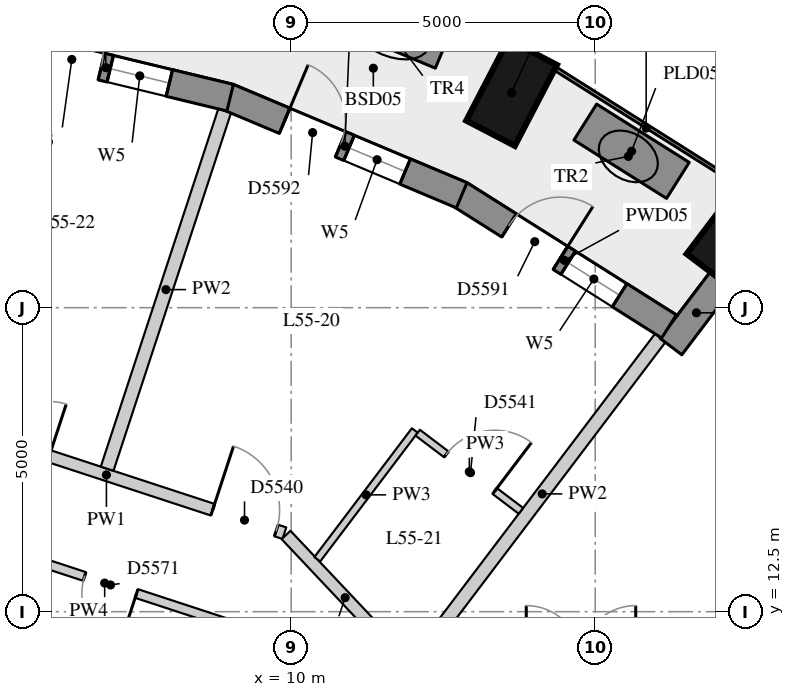
"""IFC4 building model, lengths in metres.
Left out: names, types, materials, properties, quantities, classifications, styles, units other than length and angle.
Written with IfcOpenShell. Run it as: python <this file> out.ifc"""

import sys

from ifc_helpers import new_model, si_unit, direction, frame, frame_2d, origin, origin_2d, place, context, subcontext, project, spatial, rectangle, extrude, element, fill, save


model = new_model("IFC4")
c1 = context("Model", 3, precision=1e-05, world=origin(), true_north=direction((0.0, 1.0)))
c2 = subcontext(c1, "Body", "Model", "MODEL_VIEW")
j1 = project(units=[si_unit("LENGTHUNIT", "METRE"), si_unit("PLANEANGLEUNIT", "RADIAN")], contexts=[c1])
p1 = place(None, origin())
s1 = spatial("IfcSite", under=j1, at=p1, CompositionType="ELEMENT")
p2 = place(p1, origin())
s2 = spatial("IfcBuilding", under=s1, at=p2, CompositionType="ELEMENT")
p3 = place(p2, frame((0.0, 0.0, 195.8)))
s3 = spatial("IfcBuildingStorey", under=s2, at=p3, CompositionType="ELEMENT", Elevation=195.8)
for number, where, z_axis, x_axis in (
    (1, (17.316, 18.71, 0.0), (0.0, 0.0, 1.0), (0.604, 0.797, 0.0)),
    (2, (13.625, 21.035, 0.0), (0.0, 0.0, 1.0), (0.462, 0.887, 0.0)),
):
    element("IfcColumn", number, at=place(p3, frame(where, z_axis=z_axis, x_axis=x_axis)), inside=s3, PredefinedType="COLUMN", context=c2, shape_type="SweptSolid", body=[
        extrude(rectangle(XDim=1.5, YDim=0.9, at=origin_2d()), origin(), (0.0, 0.0, 1.0), 3.3),
    ])
p4 = place(p3, frame((17.085, 17.97, 0.0), z_axis=(0.0, 0.0, 1.0), x_axis=(-0.603644757989, -0.797253414011, 0.0)))
e3 = element("IfcWall", 3, at=p4, inside=s3, PredefinedType="SOLIDWALL", context=c2, shape_type="SweptSolid", body=[
    extrude(rectangle(XDim=1.391, YDim=0.45, at=frame_2d((0.695, 0.0))), origin(), (0.0, 0.0, 1.0), 3.02),
])
p5 = place(p3, frame((16.213, 17.192, 0.0), z_axis=(0.0, 0.0, 1.0), x_axis=(-0.84545185308, 0.534051649303, 0.0)))
e4 = element("IfcWall", 4, at=p5, inside=s3, PredefinedType="SOLIDWALL", context=c2, shape_type="SweptSolid", body=[
    extrude(rectangle(XDim=4.071, YDim=0.45, at=frame_2d((2.036, 0.0))), origin(), (0.0, 0.0, 1.0), 3.02),
])
p6 = place(p5, frame((0.961, 0.0, 0.4)))
e5 = element("IfcOpeningElement", 5, at=p6, cuts=e4, PredefinedType="OPENING", context=c2, shape_type="SweptSolid", body=[
    extrude(rectangle(XDim=1.0, YDim=1.75, at=frame_2d((0.5, 0.875))), frame((0.0, 0.235, 0.0), z_axis=(0.0, -1.0, 0.0), x_axis=(1.0, 0.0, 0.0)), (0.0, 0.0, 1.0), 0.47),
])
p7 = place(p5, frame((2.111, 0.0, 0.0)))
e6 = element("IfcOpeningElement", 6, at=p7, cuts=e4, PredefinedType="OPENING", context=c2, shape_type="SweptSolid", body=[
    extrude(rectangle(XDim=1.0, YDim=2.15, at=frame_2d((0.5, 1.075))), frame((0.0, 0.235, 0.0), z_axis=(0.0, -1.0, 0.0), x_axis=(1.0, 0.0, 0.0)), (0.0, 0.0, 1.0), 0.47),
])
p8 = place(p3, frame((12.804, 19.349, 0.0), z_axis=(0.0, 0.0, 1.0), x_axis=(-0.921751093055, 0.387782055351, 0.0)))
e7 = element("IfcWall", 7, at=p8, inside=s3, PredefinedType="SOLIDWALL", context=c2, shape_type="SweptSolid", body=[
    extrude(rectangle(XDim=4.168, YDim=0.45, at=frame_2d((2.084, 0.0))), origin(), (0.0, 0.0, 1.0), 3.02),
])
p9 = place(p8, frame((1.009, 0.0, 0.4)))
e8 = element("IfcOpeningElement", 8, at=p9, cuts=e7, PredefinedType="OPENING", context=c2, shape_type="SweptSolid", body=[
    extrude(rectangle(XDim=1.0, YDim=1.75, at=frame_2d((0.5, 0.875))), frame((0.0, 0.235, 0.0), z_axis=(0.0, -1.0, 0.0), x_axis=(1.0, 0.0, 0.0)), (0.0, 0.0, 1.0), 0.47),
])
p10 = place(p8, frame((2.159, 0.0, 0.0)))
e9 = element("IfcOpeningElement", 9, at=p10, cuts=e7, PredefinedType="OPENING", context=c2, shape_type="SweptSolid", body=[
    extrude(rectangle(XDim=1.0, YDim=2.15, at=frame_2d((0.5, 1.075))), frame((0.0, 0.235, 0.0), z_axis=(0.0, -1.0, 0.0), x_axis=(1.0, 0.0, 0.0)), (0.0, 0.0, 1.0), 0.47),
])
p11 = place(p3, frame((8.996, 20.954, 0.0), z_axis=(0.0, 0.0, 1.0), x_axis=(-0.971994057868, 0.235005428593, 0.0)))
e10 = element("IfcWall", 10, at=p11, inside=s3, PredefinedType="SOLIDWALL", context=c2, shape_type="SweptSolid", body=[
    extrude(rectangle(XDim=4.208, YDim=0.45, at=frame_2d((2.104, 0.0))), origin(), (0.0, 0.0, 1.0), 3.02),
])
p12 = place(p11, frame((1.029, 0.0, 0.4)))
e11 = element("IfcOpeningElement", 11, at=p12, cuts=e10, PredefinedType="OPENING", context=c2, shape_type="SweptSolid", body=[
    extrude(rectangle(XDim=1.0, YDim=1.75, at=frame_2d((0.5, 0.875))), frame((0.0, 0.235, 0.0), z_axis=(0.0, -1.0, 0.0), x_axis=(1.0, 0.0, 0.0)), (0.0, 0.0, 1.0), 0.47),
])
p13 = place(p11, frame((2.179, 0.0, 0.0)))
e12 = element("IfcOpeningElement", 12, at=p13, cuts=e10, PredefinedType="OPENING", context=c2, shape_type="SweptSolid", body=[
    extrude(rectangle(XDim=1.0, YDim=2.15, at=frame_2d((0.5, 1.075))), frame((0.0, 0.235, 0.0), z_axis=(0.0, -1.0, 0.0), x_axis=(1.0, 0.0, 0.0)), (0.0, 0.0, 1.0), 0.47),
])
p14 = place(p3, frame((16.36, 19.593, 0.0), z_axis=(0.0, 0.0, 1.0), x_axis=(-0.846149017978, 0.532946375703, 0.0)))
e13 = element("IfcWall", 13, at=p14, inside=s3, PredefinedType="USERDEFINED", context=c2, shape_type="SweptSolid", body=[
    extrude(rectangle(XDim=1.8, YDim=0.7, at=frame_2d((0.9, 0.0))), origin(), (0.0, 0.0, 1.0), 0.75),
])
p15 = place(p3, frame((12.506, 21.762, 0.0), z_axis=(0.0, 0.0, 1.0), x_axis=(-0.922155368213, 0.386819695564, 0.0)))
e14 = element("IfcWall", 14, at=p15, inside=s3, PredefinedType="USERDEFINED", context=c2, shape_type="SweptSolid", body=[
    extrude(rectangle(XDim=1.8, YDim=0.7, at=frame_2d((0.9, 0.0))), origin(), (0.0, 0.0, 1.0), 0.75),
])
p16 = place(p3, frame((4.035, 15.708, 0.0), z_axis=(0.0, 0.0, 1.0), x_axis=(0.950331063317, -0.31124085544, 0.0)))
e15 = element("IfcWall", 15, at=p16, inside=s3, PredefinedType="PARTITIONING", context=c2, shape_type="SweptSolid", body=[
    extrude(rectangle(XDim=6.159, YDim=0.2, at=frame_2d((3.08, 0.0))), origin(), (0.0, 0.0, 1.0), 3.02),
])
p17 = place(p16, frame((4.919, 0.0, 0.0)))
e16 = element("IfcOpeningElement", 16, at=p17, cuts=e15, PredefinedType="OPENING", context=c2, shape_type="SweptSolid", body=[
    extrude(rectangle(XDim=1.1, YDim=2.1, at=frame_2d((0.55, 1.05))), frame((0.0, 0.11, 0.0), z_axis=(0.0, -1.0, 0.0), x_axis=(1.0, 0.0, 0.0)), (0.0, 0.0, 1.0), 0.22),
])
p18 = place(p16, frame((1.189, 0.0, 0.0)))
e17 = element("IfcOpeningElement", 17, at=p18, cuts=e15, PredefinedType="OPENING", context=c2, shape_type="SweptSolid", body=[
    extrude(rectangle(XDim=0.9, YDim=2.1, at=frame_2d((0.45, 1.05))), frame((0.0, 0.11, 0.0), z_axis=(0.0, -1.0, 0.0), x_axis=(1.0, 0.0, 0.0)), (0.0, 0.0, 1.0), 0.22),
])
p19 = place(p3, frame((9.916, 13.762, 0.0), z_axis=(0.0, 0.0, 1.0), x_axis=(0.686041532799, -0.727562378958, 0.0)))
e18 = element("IfcWall", 18, at=p19, inside=s3, PredefinedType="PARTITIONING", context=c2, shape_type="SweptSolid", body=[
    extrude(rectangle(XDim=2.834, YDim=0.2, at=frame_2d((1.417, 0.0))), origin(), (0.0, 0.0, 1.0), 3.02),
])
p20 = place(p3, frame((4.917, 13.631, 0.0), z_axis=(0.0, 0.0, 1.0), x_axis=(0.950299632499, -0.311336808733, 0.0)))
e19 = element("IfcWall", 19, at=p20, inside=s3, PredefinedType="PARTITIONING", context=c2, shape_type="SweptSolid", body=[
    extrude(rectangle(XDim=4.241, YDim=0.15, at=frame_2d((2.121, 0.0))), origin(), (0.0, 0.0, 1.0), 3.02),
])
p21 = place(p20, frame((1.773, 0.0, 0.0)))
e20 = element("IfcOpeningElement", 20, at=p21, cuts=e19, PredefinedType="OPENING", context=c2, shape_type="SweptSolid", body=[
    extrude(rectangle(XDim=0.9, YDim=2.1, at=frame_2d((0.45, 1.05))), frame((0.0, 0.085, 0.0), z_axis=(0.0, -1.0, 0.0), x_axis=(1.0, 0.0, 0.0)), (0.0, 0.0, 1.0), 0.17),
])
p22 = place(p3, frame((16.077, 17.011, 0.0), z_axis=(0.0, 0.0, 1.0), x_axis=(-0.603635635975, -0.797260320712, 0.0)))
e21 = element("IfcWall", 21, at=p22, inside=s3, PredefinedType="PARTITIONING", context=c2, shape_type="SweptSolid", body=[
    extrude(rectangle(XDim=6.457, YDim=0.22, at=frame_2d((3.229, 0.0))), origin(), (0.0, 0.0, 1.0), 3.02),
])
p23 = place(p3, frame((8.908, 20.743, 0.0), z_axis=(0.0, 0.0, 1.0), x_axis=(-0.311984764468, -0.950087104817, 0.0)))
e22 = element("IfcWall", 22, at=p23, inside=s3, PredefinedType="PARTITIONING", context=c2, shape_type="SweptSolid", body=[
    extrude(rectangle(XDim=6.202, YDim=0.22, at=frame_2d((3.101, 0.0))), origin(), (0.0, 0.0, 1.0), 3.02),
])
p24 = place(p3, frame((10.43, 13.363, 0.0), z_axis=(0.0, 0.0, 1.0), x_axis=(0.603597479969, 0.797289208616, 0.0)))
e23 = element("IfcWall", 23, at=p24, inside=s3, PredefinedType="PARTITIONING", context=c2, shape_type="SweptSolid", body=[
    extrude(rectangle(XDim=2.656, YDim=0.12, at=frame_2d((1.328, 0.0))), origin(), (0.0, 0.0, 1.0), 3.02),
])
p25 = place(p3, frame((12.081, 15.444, 0.0), z_axis=(0.0, 0.0, 1.0), x_axis=(0.797240905551, -0.603661277967, 0.0)))
e24 = element("IfcWall", 24, at=p25, inside=s3, PredefinedType="PARTITIONING", context=c2, shape_type="SweptSolid", body=[
    extrude(rectangle(XDim=2.13, YDim=0.12, at=frame_2d((1.065, 0.0))), origin(), (0.0, 0.0, 1.0), 3.02),
])
p26 = place(p25, frame((0.59, 0.0, 0.0)))
e25 = element("IfcOpeningElement", 25, at=p26, cuts=e24, PredefinedType="OPENING", context=c2, shape_type="SweptSolid", body=[
    extrude(rectangle(XDim=1.0, YDim=2.1, at=frame_2d((0.5, 1.05))), frame((0.0, 0.07, 0.0), z_axis=(0.0, -1.0, 0.0), x_axis=(1.0, 0.0, 0.0)), (0.0, 0.0, 1.0), 0.14),
])
p27 = place(p6, origin())
e26 = element("IfcWindow", 26, at=p27, inside=s3, PartitioningType="SINGLE_PANEL", PredefinedType="WINDOW", context=c2, shape_type="SweptSolid", body=[
    extrude(rectangle(XDim=1.0, YDim=1.75, at=frame_2d((0.5, 0.875))), frame((0.0, 0.035, 0.0), z_axis=(0.0, -1.0, 0.0), x_axis=(1.0, 0.0, 0.0)), (0.0, 0.0, 1.0), 0.06),
])
fill(e5, e26)
p28 = place(p7, frame((1.0, 0.0, 0.0), z_axis=(0.0, 0.0, 1.0), x_axis=(-1.0, 0.0, 0.0)))
e27 = element("IfcDoor", 27, at=p28, inside=s3, OperationType="SINGLE_SWING_RIGHT", PredefinedType="DOOR", context=c2, shape_type="SweptSolid", body=[
    extrude(rectangle(XDim=1.0, YDim=2.15, at=frame_2d((0.5, 1.075))), frame((0.0, 0.075, 0.0), z_axis=(0.0, -1.0, 0.0), x_axis=(1.0, 0.0, 0.0)), (0.0, 0.0, 1.0), 0.05),
])
fill(e6, e27)
p29 = place(p9, origin())
e28 = element("IfcWindow", 28, at=p29, inside=s3, PartitioningType="SINGLE_PANEL", PredefinedType="WINDOW", context=c2, shape_type="SweptSolid", body=[
    extrude(rectangle(XDim=1.0, YDim=1.75, at=frame_2d((0.5, 0.875))), frame((0.0, 0.035, 0.0), z_axis=(0.0, -1.0, 0.0), x_axis=(1.0, 0.0, 0.0)), (0.0, 0.0, 1.0), 0.06),
])
fill(e8, e28)
p30 = place(p10, frame((1.0, 0.0, 0.0), z_axis=(0.0, 0.0, 1.0), x_axis=(-1.0, 0.0, 0.0)))
e29 = element("IfcDoor", 29, at=p30, inside=s3, OperationType="SINGLE_SWING_LEFT", PredefinedType="DOOR", context=c2, shape_type="SweptSolid", body=[
    extrude(rectangle(XDim=1.0, YDim=2.15, at=frame_2d((0.5, 1.075))), frame((0.0, 0.075, 0.0), z_axis=(0.0, -1.0, 0.0), x_axis=(1.0, 0.0, 0.0)), (0.0, 0.0, 1.0), 0.05),
])
fill(e9, e29)
p31 = place(p12, origin())
e30 = element("IfcWindow", 30, at=p31, inside=s3, PartitioningType="SINGLE_PANEL", PredefinedType="WINDOW", context=c2, shape_type="SweptSolid", body=[
    extrude(rectangle(XDim=1.0, YDim=1.75, at=frame_2d((0.5, 0.875))), frame((0.0, 0.035, 0.0), z_axis=(0.0, -1.0, 0.0), x_axis=(1.0, 0.0, 0.0)), (0.0, 0.0, 1.0), 0.06),
])
fill(e11, e30)
p32 = place(p13, frame((1.0, 0.0, 0.0), z_axis=(0.0, 0.0, 1.0), x_axis=(-1.0, 0.0, 0.0)))
e31 = element("IfcDoor", 31, at=p32, inside=s3, OperationType="SINGLE_SWING_LEFT", PredefinedType="DOOR", context=c2, shape_type="SweptSolid", body=[
    extrude(rectangle(XDim=1.0, YDim=2.15, at=frame_2d((0.5, 1.075))), frame((0.0, 0.075, 0.0), z_axis=(0.0, -1.0, 0.0), x_axis=(1.0, 0.0, 0.0)), (0.0, 0.0, 1.0), 0.05),
])
fill(e12, e31)
p33 = place(p17, origin())
e32 = element("IfcDoor", 32, at=p33, inside=s3, OperationType="SINGLE_SWING_LEFT", PredefinedType="DOOR", context=c2, shape_type="SweptSolid", body=[
    extrude(rectangle(XDim=1.1, YDim=2.1, at=frame_2d((0.55, 1.05))), frame((0.0, 0.025, 0.0), z_axis=(0.0, -1.0, 0.0), x_axis=(1.0, 0.0, 0.0)), (0.0, 0.0, 1.0), 0.05),
])
fill(e16, e32)
p34 = place(p26, origin())
e33 = element("IfcDoor", 33, at=p34, inside=s3, OperationType="SINGLE_SWING_RIGHT", PredefinedType="DOOR", context=c2, shape_type="SweptSolid", body=[
    extrude(rectangle(XDim=1.0, YDim=2.1, at=frame_2d((0.5, 1.05))), frame((0.0, 0.025, 0.0), z_axis=(0.0, -1.0, 0.0), x_axis=(1.0, 0.0, 0.0)), (0.0, 0.0, 1.0), 0.05),
])
fill(e25, e33)
p35 = place(p21, origin())
e34 = element("IfcDoor", 34, at=p35, inside=s3, OperationType="SINGLE_SWING_LEFT", PredefinedType="DOOR", context=c2, shape_type="SweptSolid", body=[
    extrude(rectangle(XDim=0.9, YDim=2.1, at=frame_2d((0.45, 1.05))), frame((0.0, 0.025, 0.0), z_axis=(0.0, -1.0, 0.0), x_axis=(1.0, 0.0, 0.0)), (0.0, 0.0, 1.0), 0.05),
])
fill(e20, e34)
save(model, sys.argv[1])
